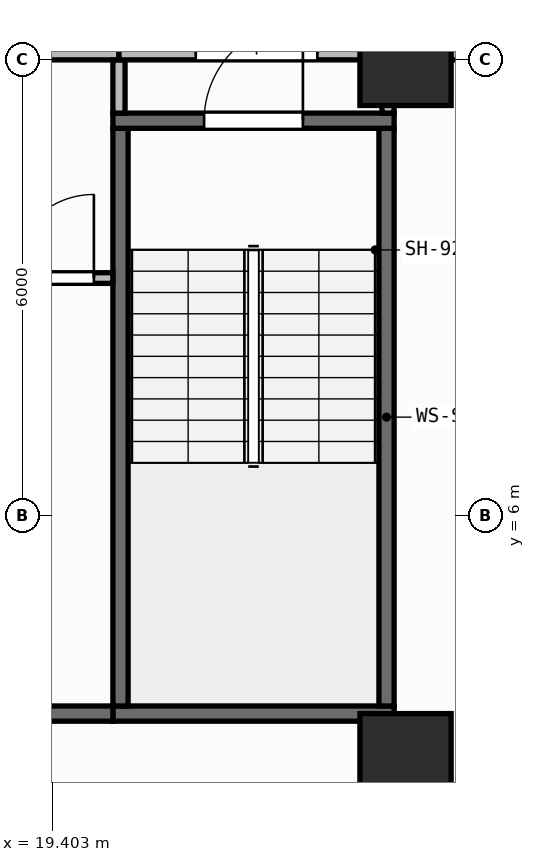
"""IFC4 building model, lengths in metres.
Left out: names, types, materials, properties, quantities, classifications, styles, units other than length and angle.
Written with IfcOpenShell. Run it as: python <this file> out.ifc"""

import sys

from ifc_helpers import new_model, si_unit, direction, frame, frame_2d, origin, origin_2d, place, context, subcontext, project, spatial, rectangle, extrude, element, fill, save


model = new_model("IFC4")
c1 = context("Model", 3, precision=1e-05, world=origin(), true_north=direction((0.0, 1.0)))
c2 = subcontext(c1, "Body", "Model", "MODEL_VIEW")
j1 = project(units=[si_unit("LENGTHUNIT", "METRE"), si_unit("PLANEANGLEUNIT", "RADIAN")], contexts=[c1])
p1 = place(None, origin())
s1 = spatial("IfcSite", under=j1, at=p1, CompositionType="ELEMENT")
p2 = place(p1, origin())
s2 = spatial("IfcBuilding", under=s1, at=p2, CompositionType="ELEMENT")
p3 = place(p2, frame((0.0, 0.0, 123.1)))
s3 = spatial("IfcBuildingStorey", under=s2, at=p3, CompositionType="ELEMENT", Elevation=123.1)
for number, where, z_axis, x_axis in (
    (1, (24.05, 2.8, 0.0), (0.0, 0.0, 1.0), (1.0, 0.0, 0.0)),
    (2, (24.05, 12.0, 0.0), (0.0, 0.0, 1.0), (1.0, 0.0, 0.0)),
):
    element("IfcColumn", number, at=place(p3, frame(where, z_axis=z_axis, x_axis=x_axis)), inside=s3, PredefinedType="COLUMN", context=c2, shape_type="SweptSolid", body=[
        extrude(rectangle(XDim=1.2, YDim=1.2, at=origin_2d()), origin(), (0.0, 0.0, 1.0), 3.95),
    ])
p4 = place(p3, frame((2.76, 0.173, 0.0), z_axis=(0.0, 0.0, 1.0), x_axis=(0.996857931723, 0.079210251617, 0.0)))
e3 = element("IfcWall", 3, at=p4, inside=s3, PredefinedType="STANDARD", context=c2, shape_type="SweptSolid", body=[
    extrude(rectangle(XDim=51.442, YDim=0.26, at=frame_2d((25.721, 0.0))), origin(), (0.0, 0.0, 1.0), 3.71),
])
p5 = place(p4, frame((24.521, 0.0, 0.9)))
e4 = element("IfcOpeningElement", 4, at=p5, cuts=e3, PredefinedType="OPENING", context=c2, shape_type="SweptSolid", body=[
    extrude(rectangle(XDim=2.4, YDim=1.65, at=frame_2d((1.2, 0.825))), frame((0.0, 0.14, 0.0), z_axis=(0.0, -1.0, 0.0), x_axis=(1.0, 0.0, 0.0)), (0.0, 0.0, 1.0), 0.28),
])
p6 = place(p3, frame((20.2, 3.4, 0.0), z_axis=(0.0, 0.0, 1.0), x_axis=(1.0, 0.0, 0.0)))
e5 = element("IfcWall", 5, at=p6, inside=s3, PredefinedType="SHEAR", context=c2, shape_type="SweptSolid", body=[
    extrude(rectangle(XDim=3.7, YDim=0.2, at=frame_2d((1.85, 0.0))), origin(), (0.0, 0.0, 1.0), 3.71),
])
for number, where, z_axis, x_axis in (
    (6, (20.3, 3.5, 0.0), (0.0, 0.0, 1.0), (0.0, 1.0, 0.0)),
    (7, (23.8, 3.5, 0.0), (0.0, 0.0, 1.0), (0.0, 1.0, 0.0)),
):
    element("IfcWall", number, at=place(p3, frame(where, z_axis=z_axis, x_axis=x_axis)), inside=s3, PredefinedType="SHEAR", context=c2, shape_type="SweptSolid", body=[
        extrude(rectangle(XDim=7.6, YDim=0.2, at=frame_2d((3.8, 0.0))), origin(), (0.0, 0.0, 1.0), 3.71),
    ])
p7 = place(p3, frame((20.2, 11.2, 0.0), z_axis=(0.0, 0.0, 1.0), x_axis=(1.0, 0.0, 0.0)))
e8 = element("IfcWall", 8, at=p7, inside=s3, PredefinedType="SHEAR", context=c2, shape_type="SweptSolid", body=[
    extrude(rectangle(XDim=3.7, YDim=0.2, at=frame_2d((1.85, 0.0))), origin(), (0.0, 0.0, 1.0), 3.71),
])
p8 = place(p7, frame((1.2, 0.0, 0.0)))
e9 = element("IfcOpeningElement", 9, at=p8, cuts=e8, PredefinedType="OPENING", context=c2, shape_type="SweptSolid", body=[
    extrude(rectangle(XDim=1.3, YDim=2.15, at=frame_2d((0.65, 1.075))), frame((0.0, 0.11, 0.0), z_axis=(0.0, -1.0, 0.0), x_axis=(1.0, 0.0, 0.0)), (0.0, 0.0, 1.0), 0.22),
])
p9 = place(p3, frame((6.5, 3.4, 0.0), z_axis=(0.0, 0.0, 1.0), x_axis=(1.0, 0.0, 0.0)))
e10 = element("IfcWall", 10, at=p9, inside=s3, PredefinedType="SHEAR", context=c2, shape_type="SweptSolid", body=[
    extrude(rectangle(XDim=13.7, YDim=0.2, at=frame_2d((6.85, 0.0))), origin(), (0.0, 0.0, 1.0), 3.71),
])
p10 = place(p3, frame((18.61, 9.13, 0.0), z_axis=(0.0, 0.0, 1.0), x_axis=(1.0, 0.0, 0.0)))
e11 = element("IfcWall", 11, at=p10, inside=s3, PredefinedType="PARTITIONING", context=c2, shape_type="SweptSolid", body=[
    extrude(rectangle(XDim=1.59, YDim=0.14, at=frame_2d((0.795, 0.0))), origin(), (0.0, 0.0, 1.0), 3.71),
])
p11 = place(p10, frame((0.24, 0.0, 0.0)))
e12 = element("IfcOpeningElement", 12, at=p11, cuts=e11, PredefinedType="OPENING", context=c2, shape_type="SweptSolid", body=[
    extrude(rectangle(XDim=1.1, YDim=2.1, at=frame_2d((0.55, 1.05))), frame((0.0, 0.08, 0.0), z_axis=(0.0, -1.0, 0.0), x_axis=(1.0, 0.0, 0.0)), (0.0, 0.0, 1.0), 0.16),
])
p12 = place(p3, frame((12.58, 12.08, 0.0), z_axis=(0.0, 0.0, 1.0), x_axis=(1.0, 0.0, 0.0)))
e13 = element("IfcWall", 13, at=p12, inside=s3, PredefinedType="PARTITIONING", context=c2, shape_type="SweptSolid", body=[
    extrude(rectangle(XDim=7.7, YDim=0.16, at=frame_2d((3.85, 0.0))), origin(), (0.0, 0.0, 1.0), 3.083),
])
p13 = place(p12, frame((3.05, 0.0, 0.0)))
e14 = element("IfcOpeningElement", 14, at=p13, cuts=e13, PredefinedType="OPENING", context=c2, shape_type="SweptSolid", body=[
    extrude(rectangle(XDim=1.6, YDim=2.05, at=frame_2d((0.8, 1.025))), frame((0.0, 0.09, 0.0), z_axis=(0.0, -1.0, 0.0), x_axis=(1.0, 0.0, 0.0)), (0.0, 0.0, 1.0), 0.18),
])
p14 = place(p3, frame((20.28, 11.3, 0.0), z_axis=(0.0, 0.0, 1.0), x_axis=(0.0, 1.0, 0.0)))
e15 = element("IfcWall", 15, at=p14, inside=s3, PredefinedType="PARTITIONING", context=c2, shape_type="SweptSolid", body=[
    extrude(rectangle(XDim=0.7, YDim=0.16, at=frame_2d((0.35, 0.0))), origin(), (0.0, 0.0, 1.0), 3.71),
])
p15 = place(p3, frame((20.28, 12.08, 0.0), z_axis=(0.0, 0.0, 1.0), x_axis=(1.0, 0.0, 0.0)))
e16 = element("IfcWall", 16, at=p15, inside=s3, PredefinedType="PARTITIONING", context=c2, shape_type="SweptSolid", body=[
    extrude(rectangle(XDim=3.62, YDim=0.16, at=frame_2d((1.81, 0.0))), origin(), (0.0, 0.0, 1.0), 3.083),
])
p16 = place(p15, frame((1.01, 0.0, 0.0)))
e17 = element("IfcOpeningElement", 17, at=p16, cuts=e16, PredefinedType="OPENING", context=c2, shape_type="SweptSolid", body=[
    extrude(rectangle(XDim=1.6, YDim=2.05, at=frame_2d((0.8, 1.025))), frame((0.0, 0.09, 0.0), z_axis=(0.0, -1.0, 0.0), x_axis=(1.0, 0.0, 0.0)), (0.0, 0.0, 1.0), 0.18),
])
p17 = place(p3, frame((23.82, 11.3, 0.0), z_axis=(0.0, 0.0, 1.0), x_axis=(0.0, 1.0, 0.0)))
e18 = element("IfcWall", 18, at=p17, inside=s3, PredefinedType="PARTITIONING", context=c2, shape_type="SweptSolid", body=[
    extrude(rectangle(XDim=0.7, YDim=0.16, at=frame_2d((0.35, 0.0))), origin(), (0.0, 0.0, 1.0), 3.71),
])
p18 = place(p3, frame((24.02, 12.08, 0.0), z_axis=(0.0, 0.0, 1.0), x_axis=(1.0, 0.0, 0.0)))
e19 = element("IfcWall", 19, at=p18, inside=s3, PredefinedType="PARTITIONING", context=c2, shape_type="SweptSolid", body=[
    extrude(rectangle(XDim=1.245, YDim=0.16, at=frame_2d((0.623, 0.0))), origin(), (0.0, 0.0, 1.0), 3.083),
])
p19 = place(p8, origin())
e20 = element("IfcDoor", 20, at=p19, inside=s3, OperationType="SINGLE_SWING_RIGHT", PredefinedType="DOOR", context=c2, shape_type="SweptSolid", body=[
    extrude(rectangle(XDim=1.3, YDim=2.15, at=frame_2d((0.65, 1.075))), frame((0.0, 0.025, 0.0), z_axis=(0.0, -1.0, 0.0), x_axis=(1.0, 0.0, 0.0)), (0.0, 0.0, 1.0), 0.05),
])
fill(e9, e20)
p20 = place(p11, origin())
e21 = element("IfcDoor", 21, at=p20, inside=s3, OperationType="SINGLE_SWING_RIGHT", PredefinedType="DOOR", context=c2, shape_type="SweptSolid", body=[
    extrude(rectangle(XDim=1.1, YDim=2.1, at=frame_2d((0.55, 1.05))), frame((0.0, 0.025, 0.0), z_axis=(0.0, -1.0, 0.0), x_axis=(1.0, 0.0, 0.0)), (0.0, 0.0, 1.0), 0.05),
])
fill(e12, e21)
p21 = place(p16, origin())
e22 = element("IfcDoor", 22, at=p21, inside=s3, OperationType="DOUBLE_DOOR_SINGLE_SWING", PredefinedType="DOOR", context=c2, shape_type="SweptSolid", body=[
    extrude(rectangle(XDim=1.6, YDim=2.05, at=frame_2d((0.8, 1.025))), frame((0.0, 0.025, 0.0), z_axis=(0.0, -1.0, 0.0), x_axis=(1.0, 0.0, 0.0)), (0.0, 0.0, 1.0), 0.05),
])
fill(e17, e22)
save(model, sys.argv[1])
